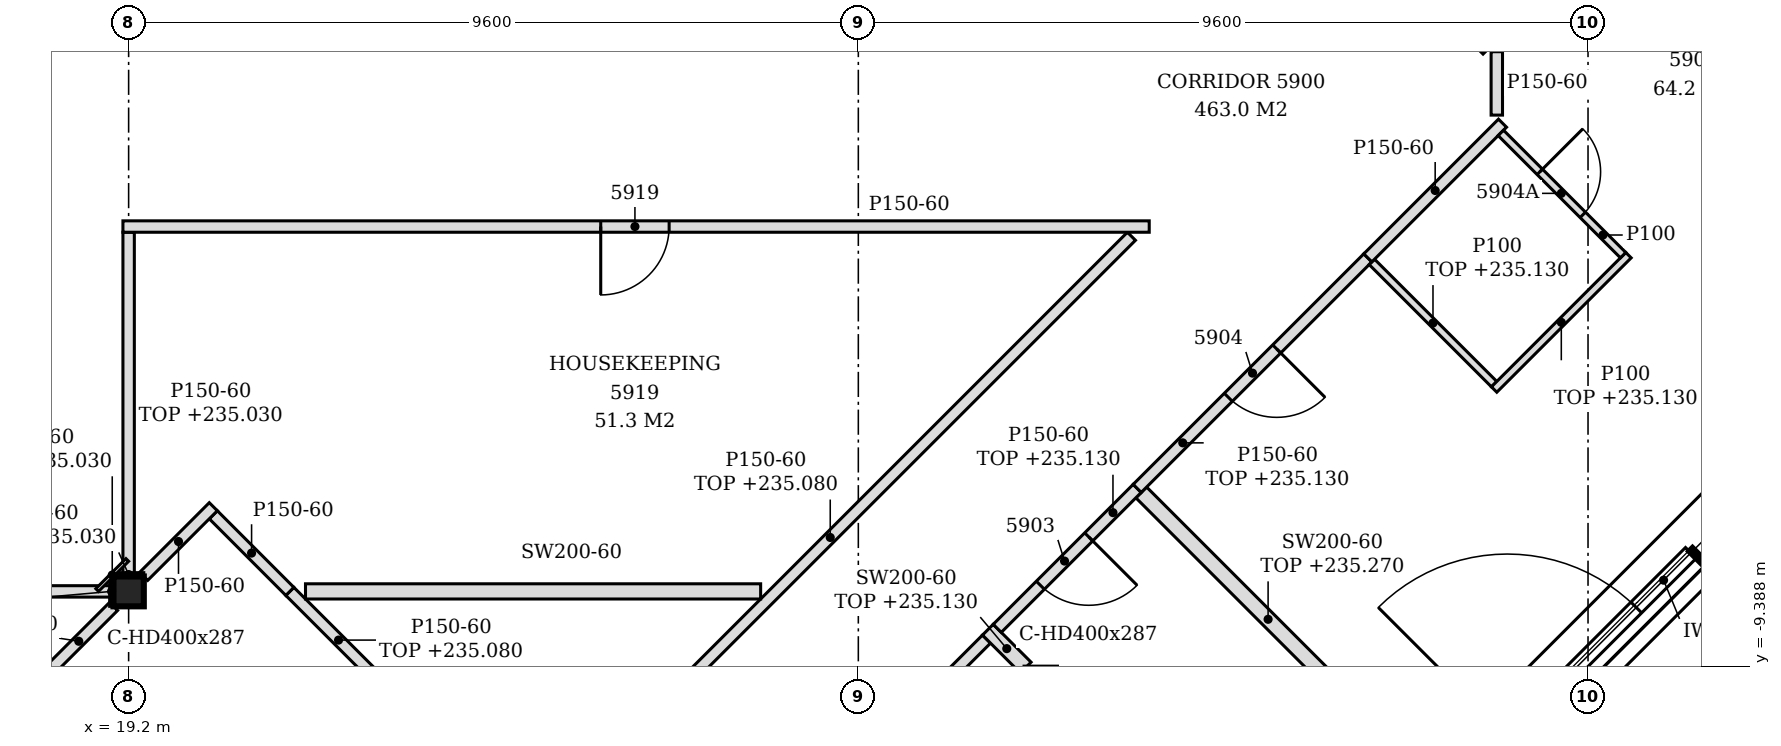
"""IFC4 building model, lengths in metres.
Left out: names, types, materials, properties, quantities, classifications, styles, units other than length and angle.
Written with IfcOpenShell. Run it as: python <this file> out.ifc"""

import sys

from ifc_helpers import new_model, si_unit, direction, frame, frame_2d, origin, origin_2d, place, context, subcontext, project, spatial, polyline, rectangle, i_section, outline, extrude, element, fill, save


model = new_model("IFC4")
c1 = context("Model", 3, precision=1e-05, world=origin(), true_north=direction((0.0, 1.0)))
c2 = subcontext(c1, "Body", "Model", "MODEL_VIEW")
j1 = project(units=[si_unit("LENGTHUNIT", "METRE"), si_unit("PLANEANGLEUNIT", "RADIAN")], contexts=[c1])
p1 = place(None, origin())
s1 = spatial("IfcSite", under=j1, at=p1, CompositionType="ELEMENT")
p2 = place(p1, origin())
s2 = spatial("IfcBuilding", under=s1, at=p2, CompositionType="ELEMENT")
p3 = place(p2, frame((0.0, 0.0, 232.2)))
s3 = spatial("IfcBuildingStorey", under=s2, at=p3, CompositionType="ELEMENT", Elevation=232.2)
p4 = place(p3, frame((19.2, -8.4, -0.15), z_axis=(0.0, 0.0, 1.0), x_axis=(1.0, 0.0, 0.0)))
e1 = element("IfcColumn", 1, at=p4, inside=s3, PredefinedType="COLUMN", context=c2, shape_type="SweptSolid", body=[
    extrude(i_section(OverallWidth=0.399, OverallDepth=0.393, WebThickness=0.023, FlangeThickness=0.037, FilletRadius=0.015, at=origin_2d()), origin(), (0.0, 0.0, 1.0), 3.6),
])
p5 = place(p3, frame((36.62, -11.026, 0.0), z_axis=(0.0, 0.0, 1.0), x_axis=(0.707106781187, 0.707106781187, 0.0)))
e2 = element("IfcWall", 2, at=p5, inside=s3, PredefinedType="NOTDEFINED", context=c2, shape_type="SweptSolid", body=[
    extrude(rectangle(XDim=4.431, YDim=0.2, at=frame_2d((2.215, 0.0))), origin(), (0.0, 0.0, 1.0), 3.45),
])
p6 = place(p5, frame((1.015, 0.0, 0.0)))
e3 = element("IfcOpeningElement", 3, at=p6, cuts=e2, PredefinedType="OPENING", context=c2, shape_type="SweptSolid", body=[
    extrude(rectangle(XDim=2.4, YDim=2.4, at=frame_2d((1.2, 1.2))), frame((0.0, 0.11, 0.0), z_axis=(0.0, -1.0, 0.0), x_axis=(1.0, 0.0, 0.0)), (0.0, 0.0, 1.0), 0.22),
])
p7 = place(p3, frame((26.316, -13.199, 0.0), z_axis=(0.0, 0.0, 1.0), x_axis=(0.707024001185, 0.707189551498, 0.0)))
e4 = element("IfcWall", 4, at=p7, inside=s3, PredefinedType="PARTITIONING", context=c2, shape_type="SweptSolid", body=[
    extrude(rectangle(XDim=5.899, YDim=0.15, at=frame_2d((2.949, 0.0))), origin(), (0.0, 0.0, 1.0), 2.88),
])
p8 = place(p7, frame((2.5, 0.0, 0.0)))
e5 = element("IfcOpeningElement", 5, at=p8, cuts=e4, PredefinedType="OPENING", context=c2, shape_type="SweptSolid", body=[
    extrude(rectangle(XDim=0.9, YDim=2.1, at=frame_2d((0.45, 1.05))), frame((0.0, 0.085, 0.0), z_axis=(0.0, -1.0, 0.0), x_axis=(1.0, 0.0, 0.0)), (0.0, 0.0, 1.0), 0.17),
])
p9 = place(p3, frame((24.468, -11.653, 0.0), z_axis=(0.0, 0.0, 1.0), x_axis=(0.707095889299, 0.707117672906, 0.0)))
e6 = element("IfcWall", 6, at=p9, inside=s3, PredefinedType="PARTITIONING", context=c2, shape_type="SweptSolid", body=[
    extrude(rectangle(XDim=11.208, YDim=0.15, at=frame_2d((5.604, 0.0))), origin(), (0.0, 0.0, 1.0), 2.88),
])
p10 = place(p3, frame((24.468, -11.547, 0.0), z_axis=(0.0, 0.0, 1.0), x_axis=(-0.707079353217, 0.707134208093, 0.0)))
e7 = element("IfcWall", 7, at=p10, inside=s3, PredefinedType="PARTITIONING", context=c2, shape_type="SweptSolid", body=[
    extrude(rectangle(XDim=4.451, YDim=0.15, at=frame_2d((2.225, 0.0))), origin(), (0.0, 0.0, 1.0), 2.88),
])
p11 = place(p10, frame((1.739, 0.0, 0.0)))
e8 = element("IfcOpeningElement", 8, at=p11, cuts=e7, PredefinedType="OPENING", context=c2, shape_type="SweptSolid", body=[
    extrude(rectangle(XDim=0.9, YDim=2.1, at=frame_2d((0.45, 1.05))), frame((0.0, 0.085, 0.0), z_axis=(0.0, -1.0, 0.0), x_axis=(1.0, 0.0, 0.0)), (0.0, 0.0, 1.0), 0.17),
])
p12 = place(p3, frame((35.86, -10.436, 0.0), z_axis=(0.0, 0.0, 1.0), x_axis=(-0.707106781187, 0.707106781187, 0.0)))
e9 = element("IfcWall", 9, at=p12, inside=s3, PredefinedType="PARTITIONING", context=c2, shape_type="SweptSolid", body=[
    extrude(rectangle(XDim=4.721, YDim=0.2, at=frame_2d((2.36, 0.0))), origin(), (0.0, 0.0, 1.0), 3.07),
])
p13 = place(p3, frame((18.086, -9.514, 0.0), z_axis=(0.0, 0.0, 1.0), x_axis=(0.707106781187, 0.707106781187, 0.0)))
e10 = element("IfcWall", 10, at=p13, inside=s3, PredefinedType="PARTITIONING", context=c2, shape_type="SweptSolid", body=[
    extrude(rectangle(XDim=1.295, YDim=0.15, at=frame_2d((0.648, 0.0))), origin(), (0.0, 0.0, 1.0), 3.45),
])
p14 = place(p3, frame((31.002, -9.402, 0.0), z_axis=(0.0, 0.0, 1.0), x_axis=(-0.707106781187, 0.707106781187, 0.0)))
e11 = element("IfcWall", 11, at=p14, inside=s3, PredefinedType="PARTITIONING", context=c2, shape_type="SweptSolid", body=[
    extrude(rectangle(XDim=0.704, YDim=0.2, at=frame_2d((0.352, 0.0))), origin(), (0.0, 0.0, 1.0), 2.93),
])
p15 = place(p3, frame((30.628, -8.886, 0.0), z_axis=(0.0, 0.0, 1.0), x_axis=(0.707106781187, 0.707106781187, 0.0)))
e12 = element("IfcWall", 12, at=p15, inside=s3, PredefinedType="PARTITIONING", context=c2, shape_type="SweptSolid", body=[
    extrude(rectangle(XDim=2.604, YDim=0.15, at=frame_2d((1.302, 0.0))), origin(), (0.0, 0.0, 1.0), 2.93),
])
p16 = place(p15, frame((0.802, 0.0, 0.0)))
e13 = element("IfcOpeningElement", 13, at=p16, cuts=e12, PredefinedType="OPENING", context=c2, shape_type="SweptSolid", body=[
    extrude(rectangle(XDim=0.9, YDim=2.1, at=frame_2d((0.45, 1.05))), frame((0.0, 0.085, 0.0), z_axis=(0.0, -1.0, 0.0), x_axis=(1.0, 0.0, 0.0)), (0.0, 0.0, 1.0), 0.17),
])
p17 = place(p3, frame((7.399, -8.4, 0.0), z_axis=(0.0, 0.0, 1.0), x_axis=(1.0, 0.0, 0.0)))
e14 = element("IfcWall", 14, at=p17, inside=s3, PredefinedType="PARTITIONING", context=c2, shape_type="SweptSolid", body=[
    extrude(rectangle(XDim=11.601, YDim=0.15, at=frame_2d((5.801, 0.0))), origin(), (0.0, 0.0, 1.0), 2.83),
])
p18 = place(p17, frame((3.4, 0.0, 0.0)))
e15 = element("IfcOpeningElement", 15, at=p18, cuts=e14, PredefinedType="OPENING", context=c2, shape_type="SweptSolid", body=[
    extrude(rectangle(XDim=0.9, YDim=2.1, at=frame_2d((0.45, 1.05))), frame((0.0, 0.085, 0.0), z_axis=(0.0, -1.0, 0.0), x_axis=(1.0, 0.0, 0.0)), (0.0, 0.0, 1.0), 0.17),
])
p19 = place(p3, frame((21.321, -8.4, 0.0), z_axis=(0.0, 0.0, 1.0), x_axis=(-0.706763941595, 0.707449454633, 0.0)))
e16 = element("IfcWall", 16, at=p19, inside=s3, PredefinedType="PARTITIONING", context=c2, shape_type="SweptSolid", body=[
    extrude(rectangle(XDim=1.425, YDim=0.15, at=frame_2d((0.712, 0.0))), origin(), (0.0, 0.0, 1.0), 3.45),
])
p20 = place(p3, frame((21.527, -8.4, 0.0), z_axis=(0.0, 0.0, 1.0), x_axis=(1.0, 0.0, 0.0)))
e17 = element("IfcWall", 17, at=p20, inside=s3, PredefinedType="PARTITIONING", context=c2, shape_type="SweptSolid", body=[
    extrude(rectangle(XDim=5.988, YDim=0.2, at=frame_2d((2.994, 0.0))), origin(), (0.0, 0.0, 1.0), 3.45),
])
p21 = place(p3, frame((19.2, -8.204, 0.0), z_axis=(0.0, 0.0, 1.0), x_axis=(0.0, 1.0, 0.0)))
e18 = element("IfcWall", 18, at=p21, inside=s3, PredefinedType="PARTITIONING", context=c2, shape_type="SweptSolid", body=[
    extrude(rectangle(XDim=4.529, YDim=0.15, at=frame_2d((2.264, 0.0))), origin(), (0.0, 0.0, 1.0), 2.83),
])
p22 = place(p3, frame((19.398, -8.202, 0.0), z_axis=(0.0, 0.0, 1.0), x_axis=(0.707200993001, 0.707012556818, 0.0)))
e19 = element("IfcWall", 19, at=p22, inside=s3, PredefinedType="PARTITIONING", context=c2, shape_type="SweptSolid", body=[
    extrude(rectangle(XDim=1.296, YDim=0.15, at=frame_2d((0.648, 0.0))), origin(), (0.0, 0.0, 1.0), 3.45),
])
p23 = place(p3, frame((32.469, -7.045, 0.0), z_axis=(0.0, 0.0, 1.0), x_axis=(0.70722059203, 0.706992952022, 0.0)))
e20 = element("IfcWall", 20, at=p23, inside=s3, PredefinedType="PARTITIONING", context=c2, shape_type="SweptSolid", body=[
    extrude(rectangle(XDim=4.29, YDim=0.15, at=frame_2d((2.145, 0.0))), origin(), (0.0, 0.0, 1.0), 2.93),
])
p24 = place(p23, frame((1.695, 0.0, 0.0)))
e21 = element("IfcOpeningElement", 21, at=p24, cuts=e20, PredefinedType="OPENING", context=c2, shape_type="SweptSolid", body=[
    extrude(rectangle(XDim=0.9, YDim=2.1, at=frame_2d((0.45, 1.05))), frame((0.0, 0.085, 0.0), z_axis=(0.0, -1.0, 0.0), x_axis=(1.0, 0.0, 0.0)), (0.0, 0.0, 1.0), 0.17),
])
p25 = place(p3, frame((37.165, -5.674, 0.0), z_axis=(0.0, 0.0, 1.0), x_axis=(-0.707106781187, 0.707106781187, 0.0)))
e22 = element("IfcWall", 22, at=p25, inside=s3, PredefinedType="PARTITIONING", context=c2, shape_type="SweptSolid", body=[
    extrude(rectangle(XDim=2.275, YDim=0.1, at=frame_2d((1.137, 0.0))), origin(), (0.0, 0.0, 1.0), 2.93),
])
p26 = place(p3, frame((37.165, -5.744, 0.0), z_axis=(0.0, 0.0, 1.0), x_axis=(0.707155609469, 0.707057949532, 0.0)))
e23 = element("IfcWall", 23, at=p26, inside=s3, PredefinedType="PARTITIONING", context=c2, shape_type="SweptSolid", body=[
    extrude(rectangle(XDim=2.5, YDim=0.1, at=frame_2d((1.25, 0.0))), origin(), (0.0, 0.0, 1.0), 2.93),
])
p27 = place(p3, frame((35.503, -4.012, 0.0), z_axis=(0.0, 0.0, 1.0), x_axis=(0.707106781187, 0.707106781187, 0.0)))
e24 = element("IfcWall", 24, at=p27, inside=s3, PredefinedType="PARTITIONING", context=c2, shape_type="SweptSolid", body=[
    extrude(rectangle(XDim=2.506, YDim=0.15, at=frame_2d((1.253, 0.0))), origin(), (0.0, 0.0, 1.0), 3.45),
])
p28 = place(p3, frame((38.862, -3.977, 0.0), z_axis=(0.0, 0.0, 1.0), x_axis=(-0.707106781187, 0.707106781187, 0.0)))
e25 = element("IfcWall", 25, at=p28, inside=s3, PredefinedType="PARTITIONING", context=c2, shape_type="SweptSolid", body=[
    extrude(rectangle(XDim=2.275, YDim=0.1, at=frame_2d((1.137, 0.0))), origin(), (0.0, 0.0, 1.0), 3.45),
])
p29 = place(p28, frame((0.75, 0.0, 0.0)))
e26 = element("IfcOpeningElement", 26, at=p29, cuts=e25, PredefinedType="OPENING", context=c2, shape_type="SweptSolid", body=[
    extrude(rectangle(XDim=0.8, YDim=2.1, at=frame_2d((0.4, 1.05))), frame((0.0, 0.06, 0.0), z_axis=(0.0, -1.0, 0.0), x_axis=(1.0, 0.0, 0.0)), (0.0, 0.0, 1.0), 0.12),
])
p30 = place(p3, frame((19.125, -3.6, 0.0), z_axis=(0.0, 0.0, 1.0), x_axis=(1.0, 0.0, 0.0)))
e27 = element("IfcWall", 27, at=p30, inside=s3, PredefinedType="PARTITIONING", context=c2, shape_type="SweptSolid", body=[
    extrude(outline(polyline([(0.0, 0.0), (13.502, 0.0), (13.502, 3.45), (12.225, 3.45), (12.223, 2.93), (11.925, 2.93), (11.923, 3.45), (0.225, 3.45), (0.223, 2.83), (0.0, 2.83), (0.0, 0.0)])), frame((0.0, 0.075, 0.0), z_axis=(0.0, -1.0, 0.0), x_axis=(1.0, 0.0, 0.0)), (0.0, 0.0, 1.0), 0.15),
])
p31 = place(p30, frame((6.286, 0.0, 0.0)))
e28 = element("IfcOpeningElement", 28, at=p31, cuts=e27, PredefinedType="OPENING", context=c2, shape_type="SweptSolid", body=[
    extrude(rectangle(XDim=0.9, YDim=2.1, at=frame_2d((0.45, 1.05))), frame((0.0, 0.085, 0.0), z_axis=(0.0, -1.0, 0.0), x_axis=(1.0, 0.0, 0.0)), (0.0, 0.0, 1.0), 0.17),
])
p32 = place(p3, frame((37.2, -2.134, 0.0), z_axis=(0.0, 0.0, 1.0), x_axis=(0.0, 1.0, 0.0)))
e29 = element("IfcWall", 29, at=p32, inside=s3, PredefinedType="PARTITIONING", context=c2, shape_type="SweptSolid", body=[
    extrude(rectangle(XDim=0.834, YDim=0.15, at=frame_2d((0.417, 0.0))), origin(), (0.0, 0.0, 1.0), 3.45),
])
p33 = place(p3, frame((37.072, -1.278, 0.0), z_axis=(0.0, 0.0, 1.0), x_axis=(-0.707106781187, 0.707106781187, 0.0)))
e30 = element("IfcWall", 30, at=p33, inside=s3, PredefinedType="PARTITIONING", context=c2, shape_type="SweptSolid", body=[
    extrude(rectangle(XDim=20.294, YDim=0.15, at=frame_2d((10.147, 0.0))), origin(), (0.0, 0.0, 1.0), 2.88),
])
p34 = place(p33, frame((3.824, 0.0, 0.0)))
e31 = element("IfcOpeningElement", 31, at=p34, cuts=e30, PredefinedType="OPENING", context=c2, shape_type="SweptSolid", body=[
    extrude(rectangle(XDim=0.9, YDim=2.1, at=frame_2d((0.45, 1.05))), frame((0.0, 0.085, 0.0), z_axis=(0.0, -1.0, 0.0), x_axis=(1.0, 0.0, 0.0)), (0.0, 0.0, 1.0), 0.17),
])
p35 = place(p33, frame((10.042, 0.0, 0.0)))
e32 = element("IfcOpeningElement", 32, at=p35, cuts=e30, PredefinedType="OPENING", context=c2, shape_type="SweptSolid", body=[
    extrude(rectangle(XDim=0.9, YDim=2.1, at=frame_2d((0.45, 1.05))), frame((0.0, 0.085, 0.0), z_axis=(0.0, -1.0, 0.0), x_axis=(1.0, 0.0, 0.0)), (0.0, 0.0, 1.0), 0.17),
])
p36 = place(p33, frame((14.443, 0.0, 0.0)))
e33 = element("IfcOpeningElement", 33, at=p36, cuts=e30, PredefinedType="OPENING", context=c2, shape_type="SweptSolid", body=[
    extrude(rectangle(XDim=0.9, YDim=2.1, at=frame_2d((0.45, 1.05))), frame((0.0, 0.085, 0.0), z_axis=(0.0, -1.0, 0.0), x_axis=(1.0, 0.0, 0.0)), (0.0, 0.0, 1.0), 0.17),
])
p37 = place(p3, frame((18.786, -8.382, 0.0), z_axis=(0.0, 0.0, 1.0), x_axis=(0.707106781187, 0.707106781187, 0.0)))
e34 = element("IfcWall", 34, at=p37, inside=s3, PredefinedType="PARTITIONING", context=c2, shape_type="SweptSolid", body=[
    extrude(rectangle(XDim=0.56, YDim=0.05, at=frame_2d((0.28, 0.0))), origin(), (0.0, 0.0, 1.0), 2.83),
])
p38 = place(p3, frame((19.0, -8.178, 0.0), z_axis=(0.0, 0.0, 1.0), x_axis=(1.0, 0.0, 0.0)))
e35 = element("IfcWall", 35, at=p38, inside=s3, PredefinedType="PARTITIONING", context=c2, shape_type="SweptSolid", body=[
    extrude(rectangle(XDim=0.399, YDim=0.05, at=frame_2d((0.199, 0.0))), origin(), (0.0, 0.0, 1.0), 2.83),
])
p39 = place(p3, frame((18.976, -8.596, 0.0), z_axis=(0.0, 0.0, 1.0), x_axis=(0.0, 1.0, 0.0)))
e36 = element("IfcWall", 36, at=p39, inside=s3, PredefinedType="PARTITIONING", context=c2, shape_type="SweptSolid", body=[
    extrude(rectangle(XDim=0.393, YDim=0.05, at=frame_2d((0.196, 0.0))), origin(), (0.0, 0.0, 1.0), 2.83),
])
p40 = place(p6, origin())
e37 = element("IfcDoor", 37, at=p40, inside=s3, OperationType="SINGLE_SWING_LEFT", PredefinedType="DOOR", context=c2, shape_type="SweptSolid", body=[
    extrude(rectangle(XDim=2.4, YDim=2.4, at=frame_2d((1.2, 1.2))), frame((0.0, 0.025, 0.0), z_axis=(0.0, -1.0, 0.0), x_axis=(1.0, 0.0, 0.0)), (0.0, 0.0, 1.0), 0.05),
])
fill(e3, e37)
p41 = place(p16, frame((0.9, 0.0, 0.0), z_axis=(0.0, 0.0, 1.0), x_axis=(-1.0, 0.0, 0.0)))
e38 = element("IfcDoor", 38, at=p41, inside=s3, OperationType="SINGLE_SWING_LEFT", PredefinedType="DOOR", context=c2, shape_type="SweptSolid", body=[
    extrude(rectangle(XDim=0.9, YDim=2.1, at=frame_2d((0.45, 1.05))), frame((0.0, 0.025, 0.0), z_axis=(0.0, -1.0, 0.0), x_axis=(1.0, 0.0, 0.0)), (0.0, 0.0, 1.0), 0.05),
])
fill(e13, e38)
p42 = place(p24, frame((0.9, 0.0, 0.0), z_axis=(0.0, 0.0, 1.0), x_axis=(-1.0, 0.0, 0.0)))
e39 = element("IfcDoor", 39, at=p42, inside=s3, OperationType="SINGLE_SWING_LEFT", PredefinedType="DOOR", context=c2, shape_type="SweptSolid", body=[
    extrude(rectangle(XDim=0.9, YDim=2.1, at=frame_2d((0.45, 1.05))), frame((0.0, 0.025, 0.0), z_axis=(0.0, -1.0, 0.0), x_axis=(1.0, 0.0, 0.0)), (0.0, 0.0, 1.0), 0.05),
])
fill(e21, e39)
p43 = place(p29, frame((0.8, 0.0, 0.0), z_axis=(0.0, 0.0, 1.0), x_axis=(-1.0, 0.0, 0.0)))
e40 = element("IfcDoor", 40, at=p43, inside=s3, OperationType="SINGLE_SWING_LEFT", PredefinedType="DOOR", context=c2, shape_type="SweptSolid", body=[
    extrude(rectangle(XDim=0.8, YDim=2.1, at=frame_2d((0.4, 1.05))), frame((0.0, 0.025, 0.0), z_axis=(0.0, -1.0, 0.0), x_axis=(1.0, 0.0, 0.0)), (0.0, 0.0, 1.0), 0.05),
])
fill(e26, e40)
p44 = place(p31, frame((0.9, 0.0, 0.0), z_axis=(0.0, 0.0, 1.0), x_axis=(-1.0, 0.0, 0.0)))
e41 = element("IfcDoor", 41, at=p44, inside=s3, OperationType="SINGLE_SWING_RIGHT", PredefinedType="DOOR", context=c2, shape_type="SweptSolid", body=[
    extrude(rectangle(XDim=0.9, YDim=2.1, at=frame_2d((0.45, 1.05))), frame((0.0, 0.025, 0.0), z_axis=(0.0, -1.0, 0.0), x_axis=(1.0, 0.0, 0.0)), (0.0, 0.0, 1.0), 0.05),
])
fill(e28, e41)
save(model, sys.argv[1])
